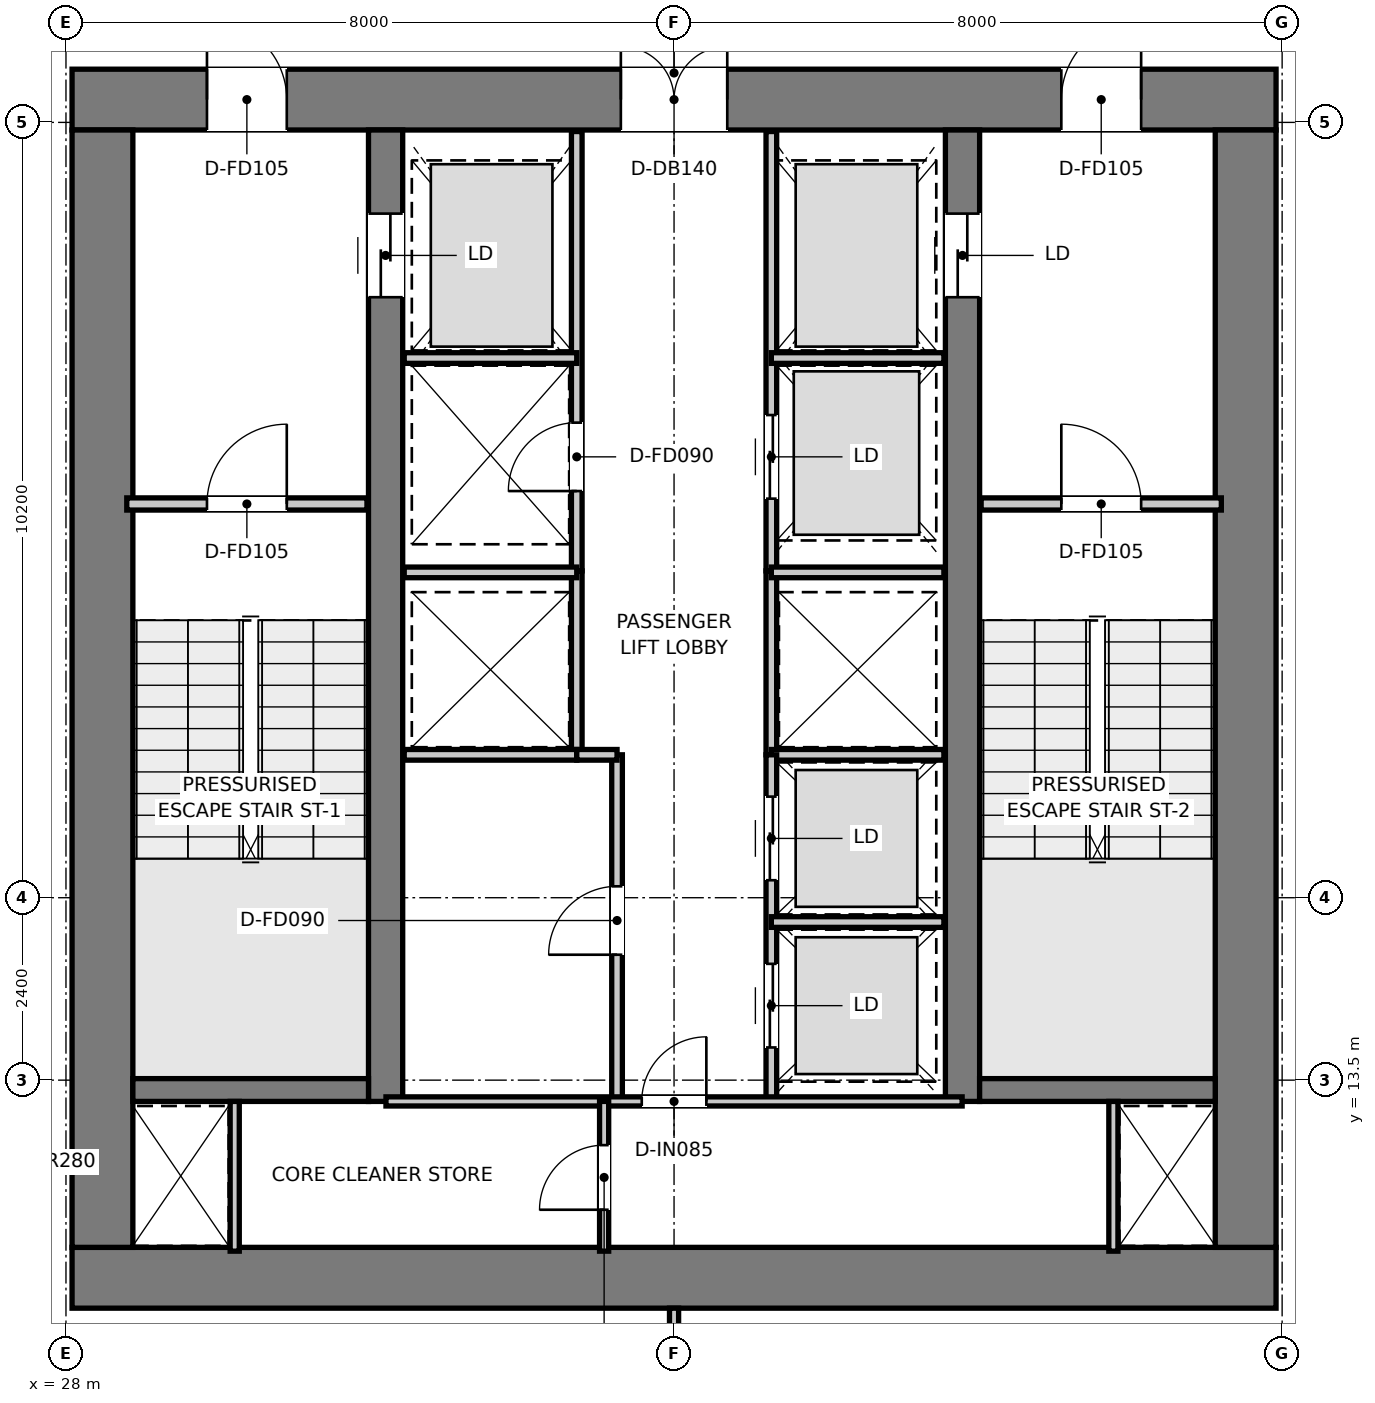
"""IFC4 building model, lengths in metres.
Left out: names, types, materials, properties, quantities, classifications, styles, units other than length and angle.
Written with IfcOpenShell. Run it as: python <this file> out.ifc"""

import sys

from ifc_helpers import new_model, si_unit, direction, frame, frame_2d, origin, place, context, subcontext, project, spatial, rectangle, extrude, element, fill, save


model = new_model("IFC4")
c1 = context("Model", 3, precision=1e-05, world=origin(), true_north=direction((0.0, 1.0)))
c2 = subcontext(c1, "Body", "Model", "MODEL_VIEW")
j1 = project(units=[si_unit("LENGTHUNIT", "METRE"), si_unit("PLANEANGLEUNIT", "RADIAN")], contexts=[c1])
p1 = place(None, origin())
s1 = spatial("IfcSite", under=j1, at=p1, CompositionType="ELEMENT")
p2 = place(p1, origin())
s2 = spatial("IfcBuilding", under=s1, at=p2, CompositionType="ELEMENT")
p3 = place(p2, frame((0.0, 0.0, 227.05)))
s3 = spatial("IfcBuildingStorey", under=s2, at=p3, CompositionType="ELEMENT", Elevation=227.05)
p4 = place(p3, frame((28.08, 10.9, 0.0), z_axis=(0.0, 0.0, 1.0), x_axis=(1.0, 0.0, 0.0)))
e1 = element("IfcWall", 1, at=p4, inside=s3, PredefinedType="SHEAR", context=c2, shape_type="SweptSolid", body=[
    extrude(rectangle(XDim=15.84, YDim=0.8, at=frame_2d((7.92, 0.0))), origin(), (0.0, 0.0, 1.0), 3.95),
])
p5 = place(p3, frame((28.08, 26.4, 0.0), z_axis=(0.0, 0.0, 1.0), x_axis=(1.0, 0.0, 0.0)))
e2 = element("IfcWall", 2, at=p5, inside=s3, PredefinedType="SHEAR", context=c2, shape_type="SweptSolid", body=[
    extrude(rectangle(XDim=15.84, YDim=0.8, at=frame_2d((7.92, 0.0))), origin(), (0.0, 0.0, 1.0), 3.95),
])
p6 = place(p5, frame((7.22, 0.0, 0.0)))
e3 = element("IfcOpeningElement", 3, at=p6, cuts=e2, PredefinedType="OPENING", context=c2, shape_type="SweptSolid", body=[
    extrude(rectangle(XDim=1.4, YDim=2.2, at=frame_2d((0.7, 1.1))), frame((0.0, 0.41, 0.0), z_axis=(0.0, -1.0, 0.0), x_axis=(1.0, 0.0, 0.0)), (0.0, 0.0, 1.0), 0.82),
])
p7 = place(p5, frame((1.775, 0.0, 0.0)))
e4 = element("IfcOpeningElement", 4, at=p7, cuts=e2, PredefinedType="OPENING", context=c2, shape_type="SweptSolid", body=[
    extrude(rectangle(XDim=1.05, YDim=2.1, at=frame_2d((0.525, 1.05))), frame((0.0, 0.41, 0.0), z_axis=(0.0, -1.0, 0.0), x_axis=(1.0, 0.0, 0.0)), (0.0, 0.0, 1.0), 0.82),
])
p8 = place(p5, frame((13.015, 0.0, 0.0)))
e5 = element("IfcOpeningElement", 5, at=p8, cuts=e2, PredefinedType="OPENING", context=c2, shape_type="SweptSolid", body=[
    extrude(rectangle(XDim=1.05, YDim=2.1, at=frame_2d((0.525, 1.05))), frame((0.0, 0.41, 0.0), z_axis=(0.0, -1.0, 0.0), x_axis=(1.0, 0.0, 0.0)), (0.0, 0.0, 1.0), 0.82),
])
for number, where, z_axis, x_axis in (
    (6, (28.48, 11.3, 0.0), (0.0, 0.0, 1.0), (0.0, 1.0, 0.0)),
    (7, (43.52, 11.3, 0.0), (0.0, 0.0, 1.0), (0.0, 1.0, 0.0)),
):
    element("IfcWall", number, at=place(p3, frame(where, z_axis=z_axis, x_axis=x_axis)), inside=s3, PredefinedType="SHEAR", context=c2, shape_type="SweptSolid", body=[
        extrude(rectangle(XDim=14.7, YDim=0.8, at=frame_2d((7.35, 0.0))), origin(), (0.0, 0.0, 1.0), 3.95),
    ])
p9 = place(p3, frame((32.205, 13.22, 0.0), z_axis=(0.0, 0.0, 1.0), x_axis=(0.0, 1.0, 0.0)))
e8 = element("IfcWall", 8, at=p9, inside=s3, PredefinedType="SHEAR", context=c2, shape_type="SweptSolid", body=[
    extrude(rectangle(XDim=12.78, YDim=0.45, at=frame_2d((6.39, 0.0))), origin(), (0.0, 0.0, 1.0), 3.95),
])
p10 = place(p9, frame((10.58, 0.0, 0.0)))
e9 = element("IfcOpeningElement", 9, at=p10, cuts=e8, PredefinedType="OPENING", context=c2, shape_type="SweptSolid", body=[
    extrude(rectangle(XDim=1.1, YDim=2.15, at=frame_2d((0.55, 1.075))), frame((0.0, 0.235, 0.0), z_axis=(0.0, -1.0, 0.0), x_axis=(1.0, 0.0, 0.0)), (0.0, 0.0, 1.0), 0.47),
])
p11 = place(p3, frame((39.795, 13.22, 0.0), z_axis=(0.0, 0.0, 1.0), x_axis=(0.0, 1.0, 0.0)))
e10 = element("IfcWall", 10, at=p11, inside=s3, PredefinedType="SHEAR", context=c2, shape_type="SweptSolid", body=[
    extrude(rectangle(XDim=12.78, YDim=0.45, at=frame_2d((6.39, 0.0))), origin(), (0.0, 0.0, 1.0), 3.95),
])
p12 = place(p11, frame((10.58, 0.0, 0.0)))
e11 = element("IfcOpeningElement", 11, at=p12, cuts=e10, PredefinedType="OPENING", context=c2, shape_type="SweptSolid", body=[
    extrude(rectangle(XDim=1.1, YDim=2.15, at=frame_2d((0.55, 1.075))), frame((0.0, 0.235, 0.0), z_axis=(0.0, -1.0, 0.0), x_axis=(1.0, 0.0, 0.0)), (0.0, 0.0, 1.0), 0.47),
])
for number, where, z_axis, x_axis in (
    (12, (28.88, 13.37, 0.0), (0.0, 0.0, 1.0), (1.0, 0.0, 0.0)),
    (13, (40.02, 13.37, 0.0), (0.0, 0.0, 1.0), (1.0, 0.0, 0.0)),
):
    element("IfcWall", number, at=place(p3, frame(where, z_axis=z_axis, x_axis=x_axis)), inside=s3, PredefinedType="SHEAR", context=c2, shape_type="SweptSolid", body=[
        extrude(rectangle(XDim=3.1, YDim=0.3, at=frame_2d((1.55, 0.0))), origin(), (0.0, 0.0, 1.0), 3.95),
    ])
p13 = place(p3, frame((28.8, 21.08, 0.0), z_axis=(0.0, 0.0, 1.0), x_axis=(1.0, 0.0, 0.0)))
e14 = element("IfcWall", 14, at=p13, inside=s3, PredefinedType="PARTITIONING", context=c2, shape_type="SweptSolid", body=[
    extrude(rectangle(XDim=3.16, YDim=0.16, at=frame_2d((1.58, 0.0))), origin(), (0.0, 0.0, 1.0), 3.67),
])
p14 = place(p13, frame((1.055, 0.0, 0.0)))
e15 = element("IfcOpeningElement", 15, at=p14, cuts=e14, PredefinedType="OPENING", context=c2, shape_type="SweptSolid", body=[
    extrude(rectangle(XDim=1.05, YDim=2.1, at=frame_2d((0.525, 1.05))), frame((0.0, 0.09, 0.0), z_axis=(0.0, -1.0, 0.0), x_axis=(1.0, 0.0, 0.0)), (0.0, 0.0, 1.0), 0.18),
])
p15 = place(p3, frame((40.04, 21.08, 0.0), z_axis=(0.0, 0.0, 1.0), x_axis=(1.0, 0.0, 0.0)))
e16 = element("IfcWall", 16, at=p15, inside=s3, PredefinedType="PARTITIONING", context=c2, shape_type="SweptSolid", body=[
    extrude(rectangle(XDim=3.16, YDim=0.16, at=frame_2d((1.58, 0.0))), origin(), (0.0, 0.0, 1.0), 3.67),
])
p16 = place(p15, frame((1.055, 0.0, 0.0)))
e17 = element("IfcOpeningElement", 17, at=p16, cuts=e16, PredefinedType="OPENING", context=c2, shape_type="SweptSolid", body=[
    extrude(rectangle(XDim=1.05, YDim=2.1, at=frame_2d((0.525, 1.05))), frame((0.0, 0.09, 0.0), z_axis=(0.0, -1.0, 0.0), x_axis=(1.0, 0.0, 0.0)), (0.0, 0.0, 1.0), 0.18),
])
p17 = place(p3, frame((34.72, 20.2, 0.0), z_axis=(0.0, 0.0, 1.0), x_axis=(0.0, 1.0, 0.0)))
e18 = element("IfcWall", 18, at=p17, inside=s3, PredefinedType="PARTITIONING", context=c2, shape_type="SweptSolid", body=[
    extrude(rectangle(XDim=5.78, YDim=0.14, at=frame_2d((2.89, 0.0))), origin(), (0.0, 0.0, 1.0), 2.67),
])
p18 = place(p17, frame((1.05, 0.0, 0.0)))
e19 = element("IfcOpeningElement", 19, at=p18, cuts=e18, PredefinedType="OPENING", context=c2, shape_type="SweptSolid", body=[
    extrude(rectangle(XDim=0.9, YDim=2.1, at=frame_2d((0.45, 1.05))), frame((0.0, 0.08, 0.0), z_axis=(0.0, -1.0, 0.0), x_axis=(1.0, 0.0, 0.0)), (0.0, 0.0, 1.0), 0.16),
])
p19 = place(p3, frame((37.28, 20.2, 0.0), z_axis=(0.0, 0.0, 1.0), x_axis=(0.0, 1.0, 0.0)))
e20 = element("IfcWall", 20, at=p19, inside=s3, PredefinedType="PARTITIONING", context=c2, shape_type="SweptSolid", body=[
    extrude(rectangle(XDim=5.78, YDim=0.14, at=frame_2d((2.89, 0.0))), origin(), (0.0, 0.0, 1.0), 2.67),
])
p20 = place(p19, frame((0.95, 0.0, 0.0)))
e21 = element("IfcOpeningElement", 21, at=p20, cuts=e20, PredefinedType="OPENING", context=c2, shape_type="SweptSolid", body=[
    extrude(rectangle(XDim=1.1, YDim=2.15, at=frame_2d((0.55, 1.075))), frame((0.0, 0.08, 0.0), z_axis=(0.0, -1.0, 0.0), x_axis=(1.0, 0.0, 0.0)), (0.0, 0.0, 1.0), 0.16),
])
for number, where, z_axis, x_axis in (
    (22, (32.45, 23.0, 0.0), (0.0, 0.0, 1.0), (1.0, 0.0, 0.0)),
    (23, (37.28, 23.0, 0.0), (0.0, 0.0, 1.0), (1.0, 0.0, 0.0)),
):
    element("IfcWall", number, at=place(p3, frame(where, z_axis=z_axis, x_axis=x_axis)), inside=s3, PredefinedType="PARTITIONING", context=c2, shape_type="SweptSolid", body=[
        extrude(rectangle(XDim=2.27, YDim=0.14, at=frame_2d((1.135, 0.0))), origin(), (0.0, 0.0, 1.0), 2.67),
    ])
for number, where, z_axis, x_axis in (
    (24, (34.72, 17.78, 0.0), (0.0, 0.0, 1.0), (0.0, 1.0, 0.0)),
    (25, (37.28, 17.78, 0.0), (0.0, 0.0, 1.0), (0.0, 1.0, 0.0)),
):
    element("IfcWall", number, at=place(p3, frame(where, z_axis=z_axis, x_axis=x_axis)), inside=s3, PredefinedType="PARTITIONING", context=c2, shape_type="SweptSolid", body=[
        extrude(rectangle(XDim=2.42, YDim=0.14, at=frame_2d((1.21, 0.0))), origin(), (0.0, 0.0, 1.0), 3.67),
    ])
for number, where, z_axis, x_axis in (
    (26, (32.45, 17.78, 0.0), (0.0, 0.0, 1.0), (1.0, 0.0, 0.0)),
    (27, (32.45, 20.18, 0.0), (0.0, 0.0, 1.0), (1.0, 0.0, 0.0)),
    (28, (37.28, 17.78, 0.0), (0.0, 0.0, 1.0), (1.0, 0.0, 0.0)),
    (29, (37.28, 20.18, 0.0), (0.0, 0.0, 1.0), (1.0, 0.0, 0.0)),
):
    element("IfcWall", number, at=place(p3, frame(where, z_axis=z_axis, x_axis=x_axis)), inside=s3, PredefinedType="PARTITIONING", context=c2, shape_type="SweptSolid", body=[
        extrude(rectangle(XDim=2.27, YDim=0.14, at=frame_2d((1.135, 0.0))), origin(), (0.0, 0.0, 1.0), 3.67),
    ])
p21 = place(p3, frame((35.25, 13.22, 0.0), z_axis=(0.0, 0.0, 1.0), x_axis=(0.0, 1.0, 0.0)))
e30 = element("IfcWall", 30, at=p21, inside=s3, PredefinedType="PARTITIONING", context=c2, shape_type="SweptSolid", body=[
    extrude(rectangle(XDim=4.56, YDim=0.14, at=frame_2d((2.28, 0.0))), origin(), (0.0, 0.0, 1.0), 3.67),
])
p22 = place(p21, frame((1.93, 0.0, 0.0)))
e31 = element("IfcOpeningElement", 31, at=p22, cuts=e30, PredefinedType="OPENING", context=c2, shape_type="SweptSolid", body=[
    extrude(rectangle(XDim=0.9, YDim=2.1, at=frame_2d((0.45, 1.05))), frame((0.0, 0.08, 0.0), z_axis=(0.0, -1.0, 0.0), x_axis=(1.0, 0.0, 0.0)), (0.0, 0.0, 1.0), 0.16),
])
p23 = place(p3, frame((34.72, 17.78, 0.0), z_axis=(0.0, 0.0, 1.0), x_axis=(1.0, 0.0, 0.0)))
e32 = element("IfcWall", 32, at=p23, inside=s3, PredefinedType="PARTITIONING", context=c2, shape_type="SweptSolid", body=[
    extrude(rectangle(XDim=0.53, YDim=0.14, at=frame_2d((0.265, 0.0))), origin(), (0.0, 0.0, 1.0), 3.67),
])
p24 = place(p3, frame((37.28, 13.22, 0.0), z_axis=(0.0, 0.0, 1.0), x_axis=(0.0, 1.0, 0.0)))
e33 = element("IfcWall", 33, at=p24, inside=s3, PredefinedType="PARTITIONING", context=c2, shape_type="SweptSolid", body=[
    extrude(rectangle(XDim=4.56, YDim=0.14, at=frame_2d((2.28, 0.0))), origin(), (0.0, 0.0, 1.0), 3.67),
])
p25 = place(p24, frame((0.71, 0.0, 0.0)))
e34 = element("IfcOpeningElement", 34, at=p25, cuts=e33, PredefinedType="OPENING", context=c2, shape_type="SweptSolid", body=[
    extrude(rectangle(XDim=1.1, YDim=2.15, at=frame_2d((0.55, 1.075))), frame((0.0, 0.08, 0.0), z_axis=(0.0, -1.0, 0.0), x_axis=(1.0, 0.0, 0.0)), (0.0, 0.0, 1.0), 0.16),
])
p26 = place(p24, frame((2.91, 0.0, 0.0)))
e35 = element("IfcOpeningElement", 35, at=p26, cuts=e33, PredefinedType="OPENING", context=c2, shape_type="SweptSolid", body=[
    extrude(rectangle(XDim=1.1, YDim=2.15, at=frame_2d((0.55, 1.075))), frame((0.0, 0.08, 0.0), z_axis=(0.0, -1.0, 0.0), x_axis=(1.0, 0.0, 0.0)), (0.0, 0.0, 1.0), 0.16),
])
p27 = place(p3, frame((37.28, 15.58, 0.0), z_axis=(0.0, 0.0, 1.0), x_axis=(1.0, 0.0, 0.0)))
e36 = element("IfcWall", 36, at=p27, inside=s3, PredefinedType="PARTITIONING", context=c2, shape_type="SweptSolid", body=[
    extrude(rectangle(XDim=2.27, YDim=0.14, at=frame_2d((1.135, 0.0))), origin(), (0.0, 0.0, 1.0), 3.67),
])
for number, where, z_axis, x_axis in (
    (37, (30.22, 11.25, 0.0), (0.0, 0.0, 1.0), (0.0, 1.0, 0.0)),
    (38, (41.78, 11.25, 0.0), (0.0, 0.0, 1.0), (0.0, 1.0, 0.0)),
):
    element("IfcWall", number, at=place(p3, frame(where, z_axis=z_axis, x_axis=x_axis)), inside=s3, PredefinedType="PARTITIONING", context=c2, shape_type="SweptSolid", body=[
        extrude(rectangle(XDim=1.97, YDim=0.12, at=frame_2d((0.985, 0.0))), origin(), (0.0, 0.0, 1.0), 3.67),
    ])
p28 = place(p3, frame((32.21, 13.22, 0.0), z_axis=(0.0, 0.0, 1.0), x_axis=(1.0, 0.0, 0.0)))
e39 = element("IfcWall", 39, at=p28, inside=s3, PredefinedType="PARTITIONING", context=c2, shape_type="SweptSolid", body=[
    extrude(rectangle(XDim=7.58, YDim=0.12, at=frame_2d((3.79, 0.0))), origin(), (0.0, 0.0, 1.0), 3.67),
])
p29 = place(p28, frame((3.365, 0.0, 0.0)))
e40 = element("IfcOpeningElement", 40, at=p29, cuts=e39, PredefinedType="OPENING", context=c2, shape_type="SweptSolid", body=[
    extrude(rectangle(XDim=0.85, YDim=2.1, at=frame_2d((0.425, 1.05))), frame((0.0, 0.07, 0.0), z_axis=(0.0, -1.0, 0.0), x_axis=(1.0, 0.0, 0.0)), (0.0, 0.0, 1.0), 0.14),
])
p30 = place(p3, frame((35.08, 11.25, 0.0), z_axis=(0.0, 0.0, 1.0), x_axis=(0.0, 1.0, 0.0)))
e41 = element("IfcWall", 41, at=p30, inside=s3, PredefinedType="PARTITIONING", context=c2, shape_type="SweptSolid", body=[
    extrude(rectangle(XDim=1.97, YDim=0.12, at=frame_2d((0.985, 0.0))), origin(), (0.0, 0.0, 1.0), 3.67),
])
p31 = place(p30, frame((0.545, 0.0, 0.0)))
e42 = element("IfcOpeningElement", 42, at=p31, cuts=e41, PredefinedType="OPENING", context=c2, shape_type="SweptSolid", body=[
    extrude(rectangle(XDim=0.85, YDim=2.1, at=frame_2d((0.425, 1.05))), frame((0.0, 0.07, 0.0), z_axis=(0.0, -1.0, 0.0), x_axis=(1.0, 0.0, 0.0)), (0.0, 0.0, 1.0), 0.14),
])
p32 = place(p3, frame((36.0, 4.09, 0.0), z_axis=(0.0, 0.0, 1.0), x_axis=(0.0, 1.0, 0.0)))
e43 = element("IfcWall", 43, at=p32, inside=s3, PredefinedType="PARTITIONING", context=c2, shape_type="SweptSolid", body=[
    extrude(rectangle(XDim=6.41, YDim=0.12, at=frame_2d((3.205, 0.0))), origin(), (0.0, 0.0, 1.0), 3.67),
])
p33 = place(p14, origin())
e44 = element("IfcDoor", 44, at=p33, inside=s3, OperationType="SINGLE_SWING_RIGHT", PredefinedType="DOOR", context=c2, shape_type="SweptSolid", body=[
    extrude(rectangle(XDim=1.05, YDim=2.1, at=frame_2d((0.525, 1.05))), frame((0.0, 0.025, 0.0), z_axis=(0.0, -1.0, 0.0), x_axis=(1.0, 0.0, 0.0)), (0.0, 0.0, 1.0), 0.05),
])
fill(e15, e44)
p34 = place(p16, origin())
e45 = element("IfcDoor", 45, at=p34, inside=s3, OperationType="SINGLE_SWING_LEFT", PredefinedType="DOOR", context=c2, shape_type="SweptSolid", body=[
    extrude(rectangle(XDim=1.05, YDim=2.1, at=frame_2d((0.525, 1.05))), frame((0.0, 0.025, 0.0), z_axis=(0.0, -1.0, 0.0), x_axis=(1.0, 0.0, 0.0)), (0.0, 0.0, 1.0), 0.05),
])
fill(e17, e45)
p35 = place(p6, origin())
e46 = element("IfcDoor", 46, at=p35, inside=s3, OperationType="DOUBLE_DOOR_SINGLE_SWING", PredefinedType="DOOR", context=c2, shape_type="SweptSolid", body=[
    extrude(rectangle(XDim=1.4, YDim=2.2, at=frame_2d((0.7, 1.1))), frame((0.0, 0.025, 0.0), z_axis=(0.0, -1.0, 0.0), x_axis=(1.0, 0.0, 0.0)), (0.0, 0.0, 1.0), 0.05),
])
fill(e3, e46)
p36 = place(p7, origin())
e47 = element("IfcDoor", 47, at=p36, inside=s3, OperationType="SINGLE_SWING_LEFT", PredefinedType="DOOR", context=c2, shape_type="SweptSolid", body=[
    extrude(rectangle(XDim=1.05, YDim=2.1, at=frame_2d((0.525, 1.05))), frame((0.0, 0.025, 0.0), z_axis=(0.0, -1.0, 0.0), x_axis=(1.0, 0.0, 0.0)), (0.0, 0.0, 1.0), 0.05),
])
fill(e4, e47)
p37 = place(p8, origin())
e48 = element("IfcDoor", 48, at=p37, inside=s3, OperationType="SINGLE_SWING_RIGHT", PredefinedType="DOOR", context=c2, shape_type="SweptSolid", body=[
    extrude(rectangle(XDim=1.05, YDim=2.1, at=frame_2d((0.525, 1.05))), frame((0.0, 0.025, 0.0), z_axis=(0.0, -1.0, 0.0), x_axis=(1.0, 0.0, 0.0)), (0.0, 0.0, 1.0), 0.05),
])
fill(e5, e48)
p38 = place(p10, origin())
e49 = element("IfcDoor", 49, at=p38, inside=s3, OperationType="DOUBLE_DOOR_SLIDING", PredefinedType="DOOR", context=c2, shape_type="SweptSolid", body=[
    extrude(rectangle(XDim=1.1, YDim=2.15, at=frame_2d((0.55, 1.075))), frame((0.0, 0.025, 0.0), z_axis=(0.0, -1.0, 0.0), x_axis=(1.0, 0.0, 0.0)), (0.0, 0.0, 1.0), 0.05),
])
fill(e9, e49)
p39 = place(p12, origin())
e50 = element("IfcDoor", 50, at=p39, inside=s3, OperationType="DOUBLE_DOOR_SLIDING", PredefinedType="DOOR", context=c2, shape_type="SweptSolid", body=[
    extrude(rectangle(XDim=1.1, YDim=2.15, at=frame_2d((0.55, 1.075))), frame((0.0, 0.025, 0.0), z_axis=(0.0, -1.0, 0.0), x_axis=(1.0, 0.0, 0.0)), (0.0, 0.0, 1.0), 0.05),
])
fill(e11, e50)
p40 = place(p18, origin())
e51 = element("IfcDoor", 51, at=p40, inside=s3, OperationType="SINGLE_SWING_LEFT", PredefinedType="DOOR", context=c2, shape_type="SweptSolid", body=[
    extrude(rectangle(XDim=0.9, YDim=2.1, at=frame_2d((0.45, 1.05))), frame((0.0, 0.025, 0.0), z_axis=(0.0, -1.0, 0.0), x_axis=(1.0, 0.0, 0.0)), (0.0, 0.0, 1.0), 0.05),
])
fill(e19, e51)
p41 = place(p20, origin())
e52 = element("IfcDoor", 52, at=p41, inside=s3, OperationType="DOUBLE_DOOR_SLIDING", PredefinedType="DOOR", context=c2, shape_type="SweptSolid", body=[
    extrude(rectangle(XDim=1.1, YDim=2.15, at=frame_2d((0.55, 1.075))), frame((0.0, 0.025, 0.0), z_axis=(0.0, -1.0, 0.0), x_axis=(1.0, 0.0, 0.0)), (0.0, 0.0, 1.0), 0.05),
])
fill(e21, e52)
p42 = place(p22, origin())
e53 = element("IfcDoor", 53, at=p42, inside=s3, OperationType="SINGLE_SWING_LEFT", PredefinedType="DOOR", context=c2, shape_type="SweptSolid", body=[
    extrude(rectangle(XDim=0.9, YDim=2.1, at=frame_2d((0.45, 1.05))), frame((0.0, 0.025, 0.0), z_axis=(0.0, -1.0, 0.0), x_axis=(1.0, 0.0, 0.0)), (0.0, 0.0, 1.0), 0.05),
])
fill(e31, e53)
p43 = place(p25, origin())
e54 = element("IfcDoor", 54, at=p43, inside=s3, OperationType="DOUBLE_DOOR_SLIDING", PredefinedType="DOOR", context=c2, shape_type="SweptSolid", body=[
    extrude(rectangle(XDim=1.1, YDim=2.15, at=frame_2d((0.55, 1.075))), frame((0.0, 0.025, 0.0), z_axis=(0.0, -1.0, 0.0), x_axis=(1.0, 0.0, 0.0)), (0.0, 0.0, 1.0), 0.05),
])
fill(e34, e54)
p44 = place(p26, origin())
e55 = element("IfcDoor", 55, at=p44, inside=s3, OperationType="DOUBLE_DOOR_SLIDING", PredefinedType="DOOR", context=c2, shape_type="SweptSolid", body=[
    extrude(rectangle(XDim=1.1, YDim=2.15, at=frame_2d((0.55, 1.075))), frame((0.0, 0.025, 0.0), z_axis=(0.0, -1.0, 0.0), x_axis=(1.0, 0.0, 0.0)), (0.0, 0.0, 1.0), 0.05),
])
fill(e35, e55)
p45 = place(p29, origin())
e56 = element("IfcDoor", 56, at=p45, inside=s3, OperationType="SINGLE_SWING_RIGHT", PredefinedType="DOOR", context=c2, shape_type="SweptSolid", body=[
    extrude(rectangle(XDim=0.85, YDim=2.1, at=frame_2d((0.425, 1.05))), frame((0.0, 0.025, 0.0), z_axis=(0.0, -1.0, 0.0), x_axis=(1.0, 0.0, 0.0)), (0.0, 0.0, 1.0), 0.05),
])
fill(e40, e56)
p46 = place(p31, origin())
e57 = element("IfcDoor", 57, at=p46, inside=s3, OperationType="SINGLE_SWING_LEFT", PredefinedType="DOOR", context=c2, shape_type="SweptSolid", body=[
    extrude(rectangle(XDim=0.85, YDim=2.1, at=frame_2d((0.425, 1.05))), frame((0.0, 0.025, 0.0), z_axis=(0.0, -1.0, 0.0), x_axis=(1.0, 0.0, 0.0)), (0.0, 0.0, 1.0), 0.05),
])
fill(e42, e57)
save(model, sys.argv[1])
